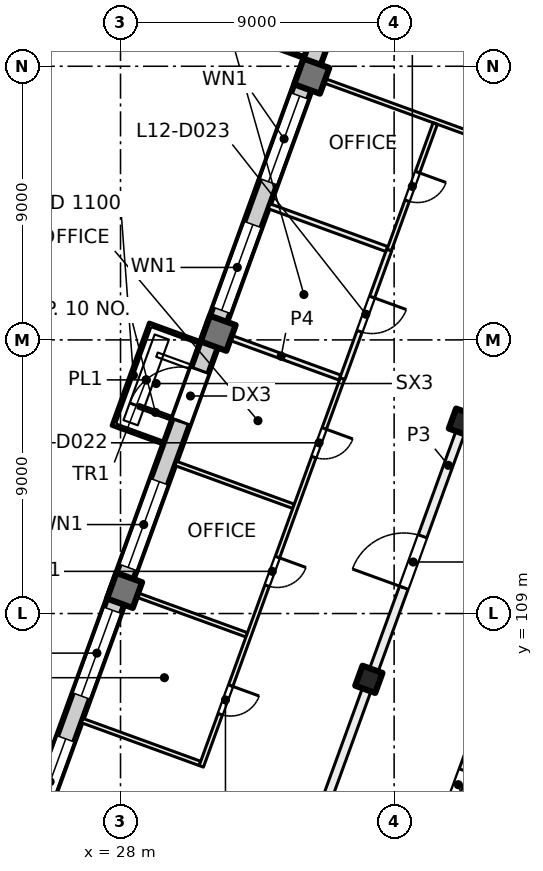
"""IFC4 building model, lengths in metres.
Left out: names, types, materials, properties, quantities, classifications, styles, units other than length and angle.
Written with IfcOpenShell. Run it as: python <this file> out.ifc"""

import sys

from ifc_helpers import new_model, si_unit, direction, frame, frame_2d, origin, origin_2d, place, context, subcontext, project, spatial, rectangle, extrude, element, fill, save


model = new_model("IFC4")
c1 = context("Model", 3, precision=1e-05, world=origin(), true_north=direction((0.0, 1.0)))
c2 = subcontext(c1, "Body", "Model", "MODEL_VIEW")
j1 = project(units=[si_unit("LENGTHUNIT", "METRE"), si_unit("PLANEANGLEUNIT", "RADIAN")], contexts=[c1])
p1 = place(None, origin())
s1 = spatial("IfcSite", under=j1, at=p1, CompositionType="ELEMENT")
p2 = place(p1, origin())
s2 = spatial("IfcBuilding", under=s1, at=p2, CompositionType="ELEMENT")
p3 = place(p2, frame((0.0, 0.0, 55.5)))
s3 = spatial("IfcBuildingStorey", under=s2, at=p3, CompositionType="ELEMENT", Elevation=55.5)
for number, where, z_axis, x_axis in (
    (1, (39.247, 115.293, 0.0), (0.0, 0.0, 1.0), (-0.342, -0.94, 0.0)),
    (2, (36.169, 106.836, 0.0), (0.0, 0.0, 1.0), (-0.342, -0.94, 0.0)),
):
    element("IfcColumn", number, at=place(p3, frame(where, z_axis=z_axis, x_axis=x_axis)), inside=s3, PredefinedType="COLUMN", context=c2, shape_type="SweptSolid", body=[
        extrude(rectangle(XDim=0.7, YDim=0.7, at=origin_2d()), origin(), (0.0, 0.0, 1.0), 4.0),
    ])
for number, where, z_axis, x_axis in (
    (3, (34.291, 126.675, 0.0), (0.0, 0.0, 1.0), (-0.342, -0.94, 0.0)),
    (4, (31.212, 118.218, 0.0), (0.0, 0.0, 1.0), (-0.342, -0.94, 0.0)),
    (5, (28.134, 109.76, 0.0), (0.0, 0.0, 1.0), (-0.342, -0.94, 0.0)),
):
    element("IfcColumn", number, at=place(p3, frame(where, z_axis=z_axis, x_axis=x_axis)), inside=s3, PredefinedType="COLUMN", context=c2, shape_type="SweptSolid", body=[
        extrude(rectangle(XDim=0.9, YDim=0.9, at=origin_2d()), origin(), (0.0, 0.0, 1.0), 4.0),
    ])
p4 = place(p3, frame((24.666, 100.669, 0.0), z_axis=(0.0, 0.0, 1.0), x_axis=(0.34201964167, 0.939692803373, 0.0)))
e6 = element("IfcWall", 6, at=p4, inside=s3, PredefinedType="SOLIDWALL", context=c2, shape_type="SweptSolid", body=[
    extrude(rectangle(XDim=32.884, YDim=0.6, at=frame_2d((16.442, 0.0))), origin(), (0.0, 0.0, 1.0), 3.625),
])
p5 = place(p4, frame((1.48, 0.0, 0.9)))
e7 = element("IfcOpeningElement", 7, at=p5, cuts=e6, PredefinedType="OPENING", context=c2, shape_type="SweptSolid", body=[
    extrude(rectangle(XDim=3.0, YDim=2.4, at=frame_2d((1.5, 1.2))), frame((0.0, 0.31, 0.0), z_axis=(0.0, -1.0, 0.0), x_axis=(1.0, 0.0, 0.0)), (0.0, 0.0, 1.0), 0.62),
])
p6 = place(p4, frame((5.98, 0.0, 0.9)))
e8 = element("IfcOpeningElement", 8, at=p6, cuts=e6, PredefinedType="OPENING", context=c2, shape_type="SweptSolid", body=[
    extrude(rectangle(XDim=3.0, YDim=2.4, at=frame_2d((1.5, 1.2))), frame((0.0, 0.31, 0.0), z_axis=(0.0, -1.0, 0.0), x_axis=(1.0, 0.0, 0.0)), (0.0, 0.0, 1.0), 0.62),
])
p7 = place(p4, frame((10.48, 0.0, 0.9)))
e9 = element("IfcOpeningElement", 9, at=p7, cuts=e6, PredefinedType="OPENING", context=c2, shape_type="SweptSolid", body=[
    extrude(rectangle(XDim=3.0, YDim=2.4, at=frame_2d((1.5, 1.2))), frame((0.0, 0.31, 0.0), z_axis=(0.0, -1.0, 0.0), x_axis=(1.0, 0.0, 0.0)), (0.0, 0.0, 1.0), 0.62),
])
p8 = place(p4, frame((15.58, 0.0, 0.0)))
e10 = element("IfcOpeningElement", 10, at=p8, cuts=e6, PredefinedType="OPENING", context=c2, shape_type="SweptSolid", body=[
    extrude(rectangle(XDim=1.8, YDim=2.4, at=frame_2d((0.9, 1.2))), frame((0.0, 0.31, 0.0), z_axis=(0.0, -1.0, 0.0), x_axis=(1.0, 0.0, 0.0)), (0.0, 0.0, 1.0), 0.62),
])
p9 = place(p4, frame((19.48, 0.0, 0.9)))
e11 = element("IfcOpeningElement", 11, at=p9, cuts=e6, PredefinedType="OPENING", context=c2, shape_type="SweptSolid", body=[
    extrude(rectangle(XDim=3.0, YDim=2.4, at=frame_2d((1.5, 1.2))), frame((0.0, 0.31, 0.0), z_axis=(0.0, -1.0, 0.0), x_axis=(1.0, 0.0, 0.0)), (0.0, 0.0, 1.0), 0.62),
])
p10 = place(p4, frame((23.98, 0.0, 0.9)))
e12 = element("IfcOpeningElement", 12, at=p10, cuts=e6, PredefinedType="OPENING", context=c2, shape_type="SweptSolid", body=[
    extrude(rectangle(XDim=3.0, YDim=2.4, at=frame_2d((1.5, 1.2))), frame((0.0, 0.31, 0.0), z_axis=(0.0, -1.0, 0.0), x_axis=(1.0, 0.0, 0.0)), (0.0, 0.0, 1.0), 0.62),
])
p11 = place(p4, frame((29.08, 0.0, 0.0)))
e13 = element("IfcOpeningElement", 13, at=p11, cuts=e6, PredefinedType="OPENING", context=c2, shape_type="SweptSolid", body=[
    extrude(rectangle(XDim=1.8, YDim=2.4, at=frame_2d((0.9, 1.2))), frame((0.0, 0.31, 0.0), z_axis=(0.0, -1.0, 0.0), x_axis=(1.0, 0.0, 0.0)), (0.0, 0.0, 1.0), 0.62),
])
p12 = place(p3, frame((26.736, 105.48, 0.0), z_axis=(0.0, 0.0, 1.0), x_axis=(0.939784783713, -0.341766821533, 0.0)))
e14 = element("IfcWall", 14, at=p12, inside=s3, PredefinedType="PARTITIONING", context=c2, shape_type="SweptSolid", body=[
    extrude(rectangle(XDim=4.125, YDim=0.15, at=frame_2d((2.062, 0.0))), origin(), (0.0, 0.0, 1.0), 3.625),
])
p13 = place(p3, frame((28.275, 109.709, 0.0), z_axis=(0.0, 0.0, 1.0), x_axis=(0.939791695678, -0.341747814529, 0.0)))
e15 = element("IfcWall", 15, at=p13, inside=s3, PredefinedType="PARTITIONING", context=c2, shape_type="SweptSolid", body=[
    extrude(rectangle(XDim=4.125, YDim=0.15, at=frame_2d((2.063, 0.0))), origin(), (0.0, 0.0, 1.0), 3.625),
])
p14 = place(p3, frame((29.814, 113.938, 0.0), z_axis=(0.0, 0.0, 1.0), x_axis=(0.93970873465, -0.341975867603, 0.0)))
e16 = element("IfcWall", 16, at=p14, inside=s3, PredefinedType="PARTITIONING", context=c2, shape_type="SweptSolid", body=[
    extrude(rectangle(XDim=4.126, YDim=0.15, at=frame_2d((2.063, 0.0))), origin(), (0.0, 0.0, 1.0), 3.625),
])
p15 = place(p3, frame((35.3, 116.73, 0.0), z_axis=(0.0, 0.0, 1.0), x_axis=(-0.342040522051, -0.939685203286, 0.0)))
e17 = element("IfcWall", 17, at=p15, inside=s3, PredefinedType="PARTITIONING", context=c2, shape_type="SweptSolid", body=[
    extrude(rectangle(XDim=13.575, YDim=0.15, at=frame_2d((6.787, 0.0))), origin(), (0.0, 0.0, 1.0), 3.625),
])
p16 = place(p15, frame((10.75, 0.0, 0.0)))
e18 = element("IfcOpeningElement", 18, at=p16, cuts=e17, PredefinedType="OPENING", context=c2, shape_type="SweptSolid", body=[
    extrude(rectangle(XDim=1.0, YDim=2.1, at=frame_2d((0.5, 1.05))), frame((0.0, 0.085, 0.0), z_axis=(0.0, -1.0, 0.0), x_axis=(1.0, 0.0, 0.0)), (0.0, 0.0, 1.0), 0.17),
])
p17 = place(p15, frame((6.25, 0.0, 0.0)))
e19 = element("IfcOpeningElement", 19, at=p17, cuts=e17, PredefinedType="OPENING", context=c2, shape_type="SweptSolid", body=[
    extrude(rectangle(XDim=1.0, YDim=2.1, at=frame_2d((0.5, 1.05))), frame((0.0, 0.085, 0.0), z_axis=(0.0, -1.0, 0.0), x_axis=(1.0, 0.0, 0.0)), (0.0, 0.0, 1.0), 0.17),
])
p18 = place(p15, frame((1.75, 0.0, 0.0)))
e20 = element("IfcOpeningElement", 20, at=p18, cuts=e17, PredefinedType="OPENING", context=c2, shape_type="SweptSolid", body=[
    extrude(rectangle(XDim=1.0, YDim=2.1, at=frame_2d((0.5, 1.05))), frame((0.0, 0.085, 0.0), z_axis=(0.0, -1.0, 0.0), x_axis=(1.0, 0.0, 0.0)), (0.0, 0.0, 1.0), 0.17),
])
p19 = place(p3, frame((31.353, 118.166, 0.0), z_axis=(0.0, 0.0, 1.0), x_axis=(0.939750086456, -0.341862216405, 0.0)))
e21 = element("IfcWall", 21, at=p19, inside=s3, PredefinedType="PARTITIONING", context=c2, shape_type="SweptSolid", body=[
    extrude(rectangle(XDim=4.113, YDim=0.175, at=frame_2d((2.056, 0.0))), origin(), (0.0, 0.0, 1.0), 3.625),
])
p20 = place(p3, frame((32.881, 97.657, 0.0), z_axis=(0.0, 0.0, 1.0), x_axis=(0.342017360004, 0.939693633828, 0.0)))
e22 = element("IfcWall", 22, at=p20, inside=s3, PredefinedType="PARTITIONING", context=c2, shape_type="SweptSolid", body=[
    extrude(rectangle(XDim=34.516, YDim=0.3, at=frame_2d((17.258, 0.0))), origin(), (0.0, 0.0, 1.0), 3.625),
])
p21 = place(p20, frame((12.975, 0.0, 0.0)))
e23 = element("IfcOpeningElement", 23, at=p21, cuts=e22, PredefinedType="OPENING", context=c2, shape_type="SweptSolid", body=[
    extrude(rectangle(XDim=1.8, YDim=2.1, at=frame_2d((0.9, 1.05))), frame((0.0, 0.16, 0.0), z_axis=(0.0, -1.0, 0.0), x_axis=(1.0, 0.0, 0.0)), (0.0, 0.0, 1.0), 0.32),
])
p22 = place(p3, frame((34.431, 126.624, 0.0), z_axis=(0.0, 0.0, 1.0), x_axis=(0.939687752599, -0.342033518263, 0.0)))
e24 = element("IfcWall", 24, at=p22, inside=s3, PredefinedType="PARTITIONING", context=c2, shape_type="SweptSolid", body=[
    extrude(rectangle(XDim=8.301, YDim=0.15, at=frame_2d((4.15, 0.0))), origin(), (0.0, 0.0, 1.0), 3.625),
])
p23 = place(p3, frame((36.839, 120.959, 0.0), z_axis=(0.0, 0.0, 1.0), x_axis=(-0.341986974999, -0.939704692407, 0.0)))
e25 = element("IfcWall", 25, at=p23, inside=s3, PredefinedType="PARTITIONING", context=c2, shape_type="SweptSolid", body=[
    extrude(rectangle(XDim=4.5, YDim=0.175, at=frame_2d((2.25, 0.0))), origin(), (0.0, 0.0, 1.0), 3.625),
])
p24 = place(p23, frame((1.65, 0.0, 0.0)))
e26 = element("IfcOpeningElement", 26, at=p24, cuts=e25, PredefinedType="OPENING", context=c2, shape_type="SweptSolid", body=[
    extrude(rectangle(XDim=1.2, YDim=2.1, at=frame_2d((0.6, 1.05))), frame((0.0, 0.097, 0.0), z_axis=(0.0, -1.0, 0.0), x_axis=(1.0, 0.0, 0.0)), (0.0, 0.0, 1.0), 0.195),
])
p25 = place(p3, frame((36.757, 120.989, 0.0), z_axis=(0.0, 0.0, 1.0), x_axis=(-0.939750086456, 0.341862216405, 0.0)))
e27 = element("IfcWall", 27, at=p25, inside=s3, PredefinedType="PARTITIONING", context=c2, shape_type="SweptSolid", body=[
    extrude(rectangle(XDim=4.113, YDim=0.175, at=frame_2d((2.056, 0.0))), origin(), (0.0, 0.0, 1.0), 3.625),
])
p26 = place(p3, frame((38.352, 125.117, 0.0), z_axis=(0.0, 0.0, 1.0), x_axis=(-0.34193355862, -0.939724130524, 0.0)))
e28 = element("IfcWall", 28, at=p26, inside=s3, PredefinedType="PARTITIONING", context=c2, shape_type="SweptSolid", body=[
    extrude(rectangle(XDim=4.425, YDim=0.15, at=frame_2d((2.212, 0.0))), origin(), (0.0, 0.0, 1.0), 3.625),
])
p27 = place(p26, frame((1.702, 0.0, 0.0)))
e29 = element("IfcOpeningElement", 29, at=p27, cuts=e28, PredefinedType="OPENING", context=c2, shape_type="SweptSolid", body=[
    extrude(rectangle(XDim=1.0, YDim=2.1, at=frame_2d((0.5, 1.05))), frame((0.0, 0.085, 0.0), z_axis=(0.0, -1.0, 0.0), x_axis=(1.0, 0.0, 0.0)), (0.0, 0.0, 1.0), 0.17),
])
p28 = place(p3, frame((47.314, 125.909, 0.0), z_axis=(0.0, 0.0, 1.0), x_axis=(-0.342010770371, -0.939696032209, 0.0)))
e30 = element("IfcWall", 30, at=p28, inside=s3, PredefinedType="PARTITIONING", context=c2, shape_type="SweptSolid", body=[
    extrude(rectangle(XDim=31.485, YDim=0.3, at=frame_2d((15.742, 0.0))), origin(), (0.0, 0.0, 1.0), 3.625),
])
p29 = place(p28, frame((28.259, 0.0, 0.0)))
e31 = element("IfcOpeningElement", 31, at=p29, cuts=e30, PredefinedType="OPENING", context=c2, shape_type="SweptSolid", body=[
    extrude(rectangle(XDim=1.2, YDim=2.1, at=frame_2d((0.6, 1.05))), frame((0.0, 0.16, 0.0), z_axis=(0.0, -1.0, 0.0), x_axis=(1.0, 0.0, 0.0)), (0.0, 0.0, 1.0), 0.32),
])
p30 = place(p28, frame((23.484, 0.0, 0.0)))
e32 = element("IfcOpeningElement", 32, at=p30, cuts=e30, PredefinedType="OPENING", context=c2, shape_type="SweptSolid", body=[
    extrude(rectangle(XDim=1.0, YDim=2.1, at=frame_2d((0.5, 1.05))), frame((0.0, 0.16, 0.0), z_axis=(0.0, -1.0, 0.0), x_axis=(1.0, 0.0, 0.0)), (0.0, 0.0, 1.0), 0.32),
])
p31 = place(p28, frame((18.984, 0.0, 0.0)))
e33 = element("IfcOpeningElement", 33, at=p31, cuts=e30, PredefinedType="OPENING", context=c2, shape_type="SweptSolid", body=[
    extrude(rectangle(XDim=1.0, YDim=2.1, at=frame_2d((0.5, 1.05))), frame((0.0, 0.16, 0.0), z_axis=(0.0, -1.0, 0.0), x_axis=(1.0, 0.0, 0.0)), (0.0, 0.0, 1.0), 0.32),
])
p32 = place(p28, frame((14.385, 0.0, 0.0)))
e34 = element("IfcOpeningElement", 34, at=p32, cuts=e30, PredefinedType="OPENING", context=c2, shape_type="SweptSolid", body=[
    extrude(rectangle(XDim=1.2, YDim=2.1, at=frame_2d((0.6, 1.05))), frame((0.0, 0.16, 0.0), z_axis=(0.0, -1.0, 0.0), x_axis=(1.0, 0.0, 0.0)), (0.0, 0.0, 1.0), 0.32),
])
p33 = place(p28, frame((9.885, 0.0, 0.0)))
e35 = element("IfcOpeningElement", 35, at=p33, cuts=e30, PredefinedType="OPENING", context=c2, shape_type="SweptSolid", body=[
    extrude(rectangle(XDim=1.2, YDim=2.1, at=frame_2d((0.6, 1.05))), frame((0.0, 0.16, 0.0), z_axis=(0.0, -1.0, 0.0), x_axis=(1.0, 0.0, 0.0)), (0.0, 0.0, 1.0), 0.32),
])
p34 = place(p28, frame((5.384, 0.0, 0.0)))
e36 = element("IfcOpeningElement", 36, at=p34, cuts=e30, PredefinedType="OPENING", context=c2, shape_type="SweptSolid", body=[
    extrude(rectangle(XDim=1.2, YDim=2.1, at=frame_2d((0.6, 1.05))), frame((0.0, 0.16, 0.0), z_axis=(0.0, -1.0, 0.0), x_axis=(1.0, 0.0, 0.0)), (0.0, 0.0, 1.0), 0.32),
])
p35 = place(p5, origin())
e37 = element("IfcWindow", 37, at=p35, inside=s3, PartitioningType="SINGLE_PANEL", PredefinedType="WINDOW", context=c2, shape_type="SweptSolid", body=[
    extrude(rectangle(XDim=3.0, YDim=2.4, at=frame_2d((1.5, 1.2))), frame((0.0, 0.03, 0.0), z_axis=(0.0, -1.0, 0.0), x_axis=(1.0, 0.0, 0.0)), (0.0, 0.0, 1.0), 0.06),
])
fill(e7, e37)
p36 = place(p6, origin())
e38 = element("IfcWindow", 38, at=p36, inside=s3, PartitioningType="SINGLE_PANEL", PredefinedType="WINDOW", context=c2, shape_type="SweptSolid", body=[
    extrude(rectangle(XDim=3.0, YDim=2.4, at=frame_2d((1.5, 1.2))), frame((0.0, 0.03, 0.0), z_axis=(0.0, -1.0, 0.0), x_axis=(1.0, 0.0, 0.0)), (0.0, 0.0, 1.0), 0.06),
])
fill(e8, e38)
p37 = place(p7, origin())
e39 = element("IfcWindow", 39, at=p37, inside=s3, PartitioningType="SINGLE_PANEL", PredefinedType="WINDOW", context=c2, shape_type="SweptSolid", body=[
    extrude(rectangle(XDim=3.0, YDim=2.4, at=frame_2d((1.5, 1.2))), frame((0.0, 0.03, 0.0), z_axis=(0.0, -1.0, 0.0), x_axis=(1.0, 0.0, 0.0)), (0.0, 0.0, 1.0), 0.06),
])
fill(e9, e39)
p38 = place(p8, origin())
e40 = element("IfcDoor", 40, at=p38, inside=s3, OperationType="DOUBLE_DOOR_SINGLE_SWING", PredefinedType="DOOR", context=c2, shape_type="SweptSolid", body=[
    extrude(rectangle(XDim=1.8, YDim=2.4, at=frame_2d((0.9, 1.2))), frame((0.0, 0.025, 0.0), z_axis=(0.0, -1.0, 0.0), x_axis=(1.0, 0.0, 0.0)), (0.0, 0.0, 1.0), 0.05),
])
fill(e10, e40)
p39 = place(p9, origin())
e41 = element("IfcWindow", 41, at=p39, inside=s3, PartitioningType="SINGLE_PANEL", PredefinedType="WINDOW", context=c2, shape_type="SweptSolid", body=[
    extrude(rectangle(XDim=3.0, YDim=2.4, at=frame_2d((1.5, 1.2))), frame((0.0, 0.03, 0.0), z_axis=(0.0, -1.0, 0.0), x_axis=(1.0, 0.0, 0.0)), (0.0, 0.0, 1.0), 0.06),
])
fill(e11, e41)
p40 = place(p10, origin())
e42 = element("IfcWindow", 42, at=p40, inside=s3, PartitioningType="SINGLE_PANEL", PredefinedType="WINDOW", context=c2, shape_type="SweptSolid", body=[
    extrude(rectangle(XDim=3.0, YDim=2.4, at=frame_2d((1.5, 1.2))), frame((0.0, 0.03, 0.0), z_axis=(0.0, -1.0, 0.0), x_axis=(1.0, 0.0, 0.0)), (0.0, 0.0, 1.0), 0.06),
])
fill(e12, e42)
p41 = place(p16, origin())
e43 = element("IfcDoor", 43, at=p41, inside=s3, OperationType="SINGLE_SWING_LEFT", PredefinedType="DOOR", context=c2, shape_type="SweptSolid", body=[
    extrude(rectangle(XDim=1.0, YDim=2.1, at=frame_2d((0.5, 1.05))), frame((0.0, 0.025, 0.0), z_axis=(0.0, -1.0, 0.0), x_axis=(1.0, 0.0, 0.0)), (0.0, 0.0, 1.0), 0.05),
])
fill(e18, e43)
p42 = place(p17, origin())
e44 = element("IfcDoor", 44, at=p42, inside=s3, OperationType="SINGLE_SWING_LEFT", PredefinedType="DOOR", context=c2, shape_type="SweptSolid", body=[
    extrude(rectangle(XDim=1.0, YDim=2.1, at=frame_2d((0.5, 1.05))), frame((0.0, 0.025, 0.0), z_axis=(0.0, -1.0, 0.0), x_axis=(1.0, 0.0, 0.0)), (0.0, 0.0, 1.0), 0.05),
])
fill(e19, e44)
p43 = place(p18, origin())
e45 = element("IfcDoor", 45, at=p43, inside=s3, OperationType="SINGLE_SWING_LEFT", PredefinedType="DOOR", context=c2, shape_type="SweptSolid", body=[
    extrude(rectangle(XDim=1.0, YDim=2.1, at=frame_2d((0.5, 1.05))), frame((0.0, 0.025, 0.0), z_axis=(0.0, -1.0, 0.0), x_axis=(1.0, 0.0, 0.0)), (0.0, 0.0, 1.0), 0.05),
])
fill(e20, e45)
p44 = place(p24, origin())
e46 = element("IfcDoor", 46, at=p44, inside=s3, OperationType="DOUBLE_DOOR_SINGLE_SWING", PredefinedType="DOOR", context=c2, shape_type="SweptSolid", body=[
    extrude(rectangle(XDim=1.2, YDim=2.1, at=frame_2d((0.6, 1.05))), frame((0.0, 0.025, 0.0), z_axis=(0.0, -1.0, 0.0), x_axis=(1.0, 0.0, 0.0)), (0.0, 0.0, 1.0), 0.05),
])
fill(e26, e46)
p45 = place(p27, origin())
e47 = element("IfcDoor", 47, at=p45, inside=s3, OperationType="SINGLE_SWING_RIGHT", PredefinedType="DOOR", context=c2, shape_type="SweptSolid", body=[
    extrude(rectangle(XDim=1.0, YDim=2.1, at=frame_2d((0.5, 1.05))), frame((0.0, 0.025, 0.0), z_axis=(0.0, -1.0, 0.0), x_axis=(1.0, 0.0, 0.0)), (0.0, 0.0, 1.0), 0.05),
])
fill(e29, e47)
p46 = place(p21, origin())
e48 = element("IfcDoor", 48, at=p46, inside=s3, OperationType="DOUBLE_DOOR_SINGLE_SWING", PredefinedType="DOOR", context=c2, shape_type="SweptSolid", body=[
    extrude(rectangle(XDim=1.8, YDim=2.1, at=frame_2d((0.9, 1.05))), frame((0.0, 0.025, 0.0), z_axis=(0.0, -1.0, 0.0), x_axis=(1.0, 0.0, 0.0)), (0.0, 0.0, 1.0), 0.05),
])
fill(e23, e48)
p47 = place(p30, origin())
e49 = element("IfcDoor", 49, at=p47, inside=s3, OperationType="SINGLE_SWING_LEFT", PredefinedType="DOOR", context=c2, shape_type="SweptSolid", body=[
    extrude(rectangle(XDim=1.0, YDim=2.1, at=frame_2d((0.5, 1.05))), frame((0.0, 0.025, 0.0), z_axis=(0.0, -1.0, 0.0), x_axis=(1.0, 0.0, 0.0)), (0.0, 0.0, 1.0), 0.05),
])
fill(e32, e49)
save(model, sys.argv[1])
